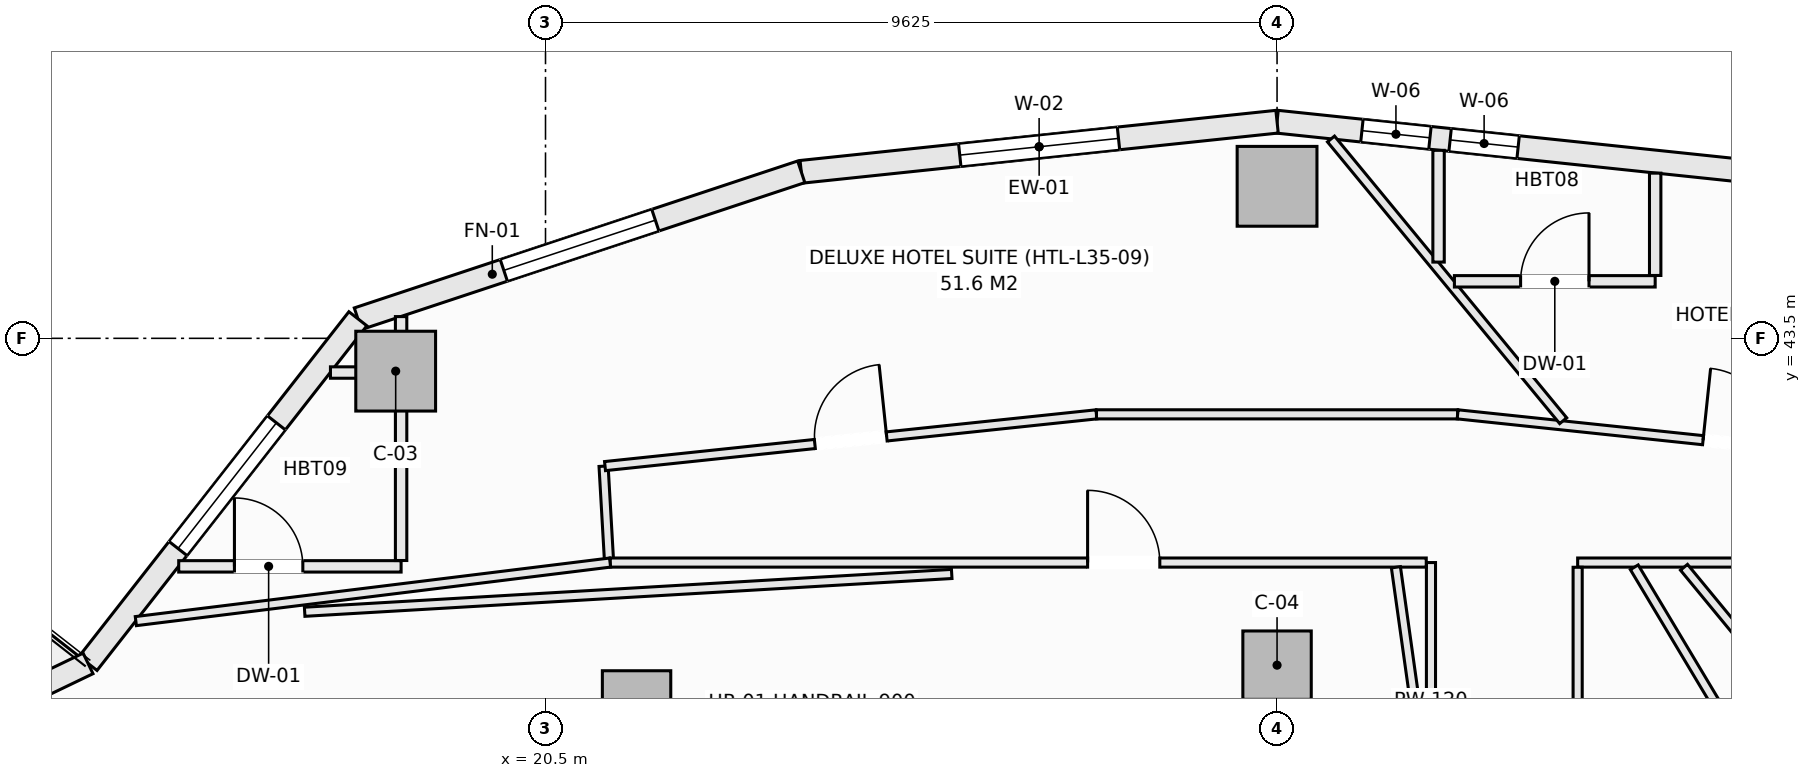
"""IFC4 building model, lengths in metres.
Left out: names, types, materials, properties, quantities, classifications, styles, units other than length and angle.
Written with IfcOpenShell. Run it as: python <this file> out.ifc"""

import sys

from ifc_helpers import new_model, si_unit, direction, frame, frame_2d, origin, origin_2d, place, context, subcontext, project, spatial, rectangle, extrude, element, fill, save


model = new_model("IFC4")
c1 = context("Model", 3, precision=1e-05, world=origin(), true_north=direction((0.0, 1.0)))
c2 = subcontext(c1, "Body", "Model", "MODEL_VIEW")
j1 = project(units=[si_unit("LENGTHUNIT", "METRE"), si_unit("PLANEANGLEUNIT", "RADIAN")], contexts=[c1])
p1 = place(None, origin())
s1 = spatial("IfcSite", under=j1, at=p1, CompositionType="ELEMENT")
p2 = place(p1, origin())
s2 = spatial("IfcBuilding", under=s1, at=p2, CompositionType="ELEMENT")
p3 = place(p2, frame((0.0, 0.0, 139.3)))
s3 = spatial("IfcBuildingStorey", under=s2, at=p3, CompositionType="ELEMENT", Elevation=139.3)
for number, where, z_axis, x_axis in (
    (1, (30.125, 45.5, -0.27), (0.0, 0.0, 1.0), (1.0, 0.0, 0.0)),
    (2, (18.529, 43.068, -0.27), (0.0, 0.0, 1.0), (1.0, 0.0, 0.0)),
):
    element("IfcColumn", number, at=place(p3, frame(where, z_axis=z_axis, x_axis=x_axis)), inside=s3, PredefinedType="COLUMN", context=c2, shape_type="SweptSolid", body=[
        extrude(rectangle(XDim=1.05, YDim=1.05, at=origin_2d()), origin(), (0.0, 0.0, 1.0), 3.4),
    ])
for number, where, z_axis, x_axis in (
    (3, (30.125, 39.2, -0.27), (0.0, 0.0, 1.0), (1.0, 0.0, 0.0)),
    (4, (21.698, 38.677, -0.27), (0.0, 0.0, 1.0), (1.0, 0.0, 0.0)),
):
    element("IfcColumn", number, at=place(p3, frame(where, z_axis=z_axis, x_axis=x_axis)), inside=s3, PredefinedType="COLUMN", context=c2, shape_type="SweptSolid", body=[
        extrude(rectangle(XDim=0.9, YDim=0.9, at=origin_2d()), origin(), (0.0, 0.0, 1.0), 3.4),
    ])
p4 = place(p3, frame((30.125, 46.35, 0.0), z_axis=(0.0, 0.0, 1.0), x_axis=(0.994498012394, -0.104755445421, 0.0)))
e5 = element("IfcWall", 5, at=p4, inside=s3, PredefinedType="SOLIDWALL", context=c2, shape_type="SweptSolid", body=[
    extrude(rectangle(XDim=6.295, YDim=0.3, at=frame_2d((3.147, 0.0))), origin(), (0.0, 0.0, 1.0), 2.653),
])
p5 = place(p4, frame((1.123, 0.0, 0.74)))
e6 = element("IfcOpeningElement", 6, at=p5, cuts=e5, PredefinedType="OPENING", context=c2, shape_type="SweptSolid", body=[
    extrude(rectangle(XDim=0.9, YDim=1.7, at=frame_2d((0.45, 0.85))), frame((0.0, 0.16, 0.0), z_axis=(0.0, -1.0, 0.0), x_axis=(1.0, 0.0, 0.0)), (0.0, 0.0, 1.0), 0.32),
])
p6 = place(p4, frame((2.289, 0.0, 0.74)))
e7 = element("IfcOpeningElement", 7, at=p6, cuts=e5, PredefinedType="OPENING", context=c2, shape_type="SweptSolid", body=[
    extrude(rectangle(XDim=0.9, YDim=1.7, at=frame_2d((0.45, 0.85))), frame((0.0, 0.16, 0.0), z_axis=(0.0, -1.0, 0.0), x_axis=(1.0, 0.0, 0.0)), (0.0, 0.0, 1.0), 0.32),
])
p7 = place(p3, frame((23.865, 45.691, 0.0), z_axis=(0.0, 0.0, 1.0), x_axis=(0.994498012394, 0.104755445421, 0.0)))
e8 = element("IfcWall", 8, at=p7, inside=s3, PredefinedType="SOLIDWALL", context=c2, shape_type="SweptSolid", body=[
    extrude(rectangle(XDim=6.295, YDim=0.3, at=frame_2d((3.147, 0.0))), origin(), (0.0, 0.0, 1.0), 2.653),
])
p8 = place(p7, frame((2.097, 0.0, 0.74)))
e9 = element("IfcOpeningElement", 9, at=p8, cuts=e8, PredefinedType="OPENING", context=c2, shape_type="SweptSolid", body=[
    extrude(rectangle(XDim=2.1, YDim=1.7, at=frame_2d((1.05, 0.85))), frame((0.0, 0.16, 0.0), z_axis=(0.0, -1.0, 0.0), x_axis=(1.0, 0.0, 0.0)), (0.0, 0.0, 1.0), 0.32),
])
p9 = place(p3, frame((18.031, 43.758, 0.0), z_axis=(0.0, 0.0, 1.0), x_axis=(0.949238009374, 0.314558741032, 0.0)))
e10 = element("IfcWall", 10, at=p9, inside=s3, PredefinedType="SOLIDWALL", context=c2, shape_type="SweptSolid", body=[
    extrude(rectangle(XDim=6.146, YDim=0.3, at=frame_2d((3.073, 0.0))), origin(), (0.0, 0.0, 1.0), 2.653),
])
p10 = place(p9, frame((2.023, 0.0, 0.74)))
e11 = element("IfcOpeningElement", 11, at=p10, cuts=e10, PredefinedType="OPENING", context=c2, shape_type="SweptSolid", body=[
    extrude(rectangle(XDim=2.1, YDim=1.7, at=frame_2d((1.05, 0.85))), frame((0.0, 0.16, 0.0), z_axis=(0.0, -1.0, 0.0), x_axis=(1.0, 0.0, 0.0)), (0.0, 0.0, 1.0), 0.32),
])
p11 = place(p3, frame((14.481, 39.223, 0.0), z_axis=(0.0, 0.0, 1.0), x_axis=(0.616435134162, 0.787405693001, 0.0)))
e12 = element("IfcWall", 12, at=p11, inside=s3, PredefinedType="SOLIDWALL", context=c2, shape_type="SweptSolid", body=[
    extrude(rectangle(XDim=5.759, YDim=0.3, at=frame_2d((2.879, 0.0))), origin(), (0.0, 0.0, 1.0), 2.653),
])
p12 = place(p11, frame((1.92, 0.0, 0.74)))
e13 = element("IfcOpeningElement", 13, at=p12, cuts=e12, PredefinedType="OPENING", context=c2, shape_type="SweptSolid", body=[
    extrude(rectangle(XDim=2.1, YDim=1.7, at=frame_2d((1.05, 0.85))), frame((0.0, 0.16, 0.0), z_axis=(0.0, -1.0, 0.0), x_axis=(1.0, 0.0, 0.0)), (0.0, 0.0, 1.0), 0.32),
])
p13 = place(p3, frame((9.178, 36.675, 0.0), z_axis=(0.0, 0.0, 1.0), x_axis=(0.901370184739, 0.433049408339, 0.0)))
e14 = element("IfcWall", 14, at=p13, inside=s3, PredefinedType="SOLIDWALL", context=c2, shape_type="SweptSolid", body=[
    extrude(rectangle(XDim=5.884, YDim=0.3, at=frame_2d((2.942, 0.0))), origin(), (0.0, 0.0, 1.0), 2.653),
])
p14 = place(p13, frame((1.892, 0.0, 0.74)))
e15 = element("IfcOpeningElement", 15, at=p14, cuts=e14, PredefinedType="OPENING", context=c2, shape_type="SweptSolid", body=[
    extrude(rectangle(XDim=2.1, YDim=1.7, at=frame_2d((1.05, 0.85))), frame((0.0, 0.16, 0.0), z_axis=(0.0, -1.0, 0.0), x_axis=(1.0, 0.0, 0.0)), (0.0, 0.0, 1.0), 0.32),
])
p15 = place(p3, frame((21.264, 41.818, 0.0), z_axis=(0.0, 0.0, 1.0), x_axis=(0.0574492264, -0.99834842935, 0.0)))
e16 = element("IfcWall", 16, at=p15, inside=s3, PredefinedType="PARTITIONING", context=c2, shape_type="SweptSolid", body=[
    extrude(rectangle(XDim=1.271, YDim=0.12, at=frame_2d((0.635, 0.0))), origin(), (0.0, 0.0, 1.0), 3.13),
])
p16 = place(p3, frame((32.15, 35.812, 0.0), z_axis=(0.0, 0.0, 1.0), x_axis=(0.0, 1.0, 0.0)))
e17 = element("IfcWall", 17, at=p16, inside=s3, PredefinedType="PARTITIONING", context=c2, shape_type="SweptSolid", body=[
    extrude(rectangle(XDim=4.738, YDim=0.12, at=frame_2d((2.369, 0.0))), origin(), (0.0, 0.0, 1.0), 3.13),
])
p17 = place(p3, frame((21.351, 40.55, 0.0), z_axis=(0.0, 0.0, 1.0), x_axis=(1.0, 0.0, 0.0)))
e18 = element("IfcWall", 18, at=p17, inside=s3, PredefinedType="PARTITIONING", context=c2, shape_type="SweptSolid", body=[
    extrude(rectangle(XDim=10.737, YDim=0.12, at=frame_2d((5.369, 0.0))), origin(), (0.0, 0.0, 1.0), 3.13),
])
p18 = place(p17, frame((6.282, 0.0, 0.0)))
e19 = element("IfcOpeningElement", 19, at=p18, cuts=e18, PredefinedType="OPENING", context=c2, shape_type="SweptSolid", body=[
    extrude(rectangle(XDim=0.95, YDim=2.1, at=frame_2d((0.475, 1.05))), frame((0.0, 0.07, 0.0), z_axis=(0.0, -1.0, 0.0), x_axis=(1.0, 0.0, 0.0)), (0.0, 0.0, 1.0), 0.14),
])
p19 = place(p3, frame((34.08, 40.55, 0.0), z_axis=(0.0, 0.0, 1.0), x_axis=(1.0, 0.0, 0.0)))
e20 = element("IfcWall", 20, at=p19, inside=s3, PredefinedType="PARTITIONING", context=c2, shape_type="SweptSolid", body=[
    extrude(rectangle(XDim=4.82, YDim=0.12, at=frame_2d((2.41, 0.0))), origin(), (0.0, 0.0, 1.0), 3.13),
])
p20 = place(p19, frame((2.368, 0.0, 0.0)))
e21 = element("IfcOpeningElement", 21, at=p20, cuts=e20, PredefinedType="OPENING", context=c2, shape_type="SweptSolid", body=[
    extrude(rectangle(XDim=0.95, YDim=2.1, at=frame_2d((0.475, 1.05))), frame((0.0, 0.07, 0.0), z_axis=(0.0, -1.0, 0.0), x_axis=(1.0, 0.0, 0.0)), (0.0, 0.0, 1.0), 0.14),
])
p21 = place(p3, frame((21.283, 41.819, 0.0), z_axis=(0.0, 0.0, 1.0), x_axis=(0.994501131299, 0.104725831799, 0.0)))
e22 = element("IfcWall", 22, at=p21, inside=s3, PredefinedType="PARTITIONING", context=c2, shape_type="SweptSolid", body=[
    extrude(rectangle(XDim=6.502, YDim=0.12, at=frame_2d((3.251, 0.0))), origin(), (0.0, 0.0, 1.0), 3.13),
])
p22 = place(p21, frame((2.776, 0.0, 0.0)))
e23 = element("IfcOpeningElement", 23, at=p22, cuts=e22, PredefinedType="OPENING", context=c2, shape_type="SweptSolid", body=[
    extrude(rectangle(XDim=0.95, YDim=2.1, at=frame_2d((0.475, 1.05))), frame((0.0, 0.07, 0.0), z_axis=(0.0, -1.0, 0.0), x_axis=(1.0, 0.0, 0.0)), (0.0, 0.0, 1.0), 0.14),
])
p23 = place(p3, frame((27.749, 42.5, 0.0), z_axis=(0.0, 0.0, 1.0), x_axis=(1.0, 0.0, 0.0)))
e24 = element("IfcWall", 24, at=p23, inside=s3, PredefinedType="PARTITIONING", context=c2, shape_type="SweptSolid", body=[
    extrude(rectangle(XDim=4.752, YDim=0.12, at=frame_2d((2.376, 0.0))), origin(), (0.0, 0.0, 1.0), 3.13),
])
p24 = place(p3, frame((32.501, 42.5, 0.0), z_axis=(0.0, 0.0, 1.0), x_axis=(0.994501131299, -0.104725831799, 0.0)))
e25 = element("IfcWall", 25, at=p24, inside=s3, PredefinedType="PARTITIONING", context=c2, shape_type="SweptSolid", body=[
    extrude(rectangle(XDim=6.502, YDim=0.12, at=frame_2d((3.251, 0.0))), origin(), (0.0, 0.0, 1.0), 3.13),
])
p25 = place(p24, frame((3.247, 0.0, 0.0)))
e26 = element("IfcOpeningElement", 26, at=p25, cuts=e25, PredefinedType="OPENING", context=c2, shape_type="SweptSolid", body=[
    extrude(rectangle(XDim=0.95, YDim=2.1, at=frame_2d((0.475, 1.05))), frame((0.0, 0.07, 0.0), z_axis=(0.0, -1.0, 0.0), x_axis=(1.0, 0.0, 0.0)), (0.0, 0.0, 1.0), 0.14),
])
p26 = place(p3, frame((34.08, 35.812, 0.0), z_axis=(0.0, 0.0, 1.0), x_axis=(0.0, 1.0, 0.0)))
e27 = element("IfcWall", 27, at=p26, inside=s3, PredefinedType="PARTITIONING", context=c2, shape_type="SweptSolid", body=[
    extrude(rectangle(XDim=4.676, YDim=0.12, at=frame_2d((2.338, 0.0))), origin(), (0.0, 0.0, 1.0), 2.812),
])
p27 = place(p3, frame((34.825, 40.488, 0.0), z_axis=(0.0, 0.0, 1.0), x_axis=(0.513579710685, -0.85804188754, 0.0)))
e28 = element("IfcWall", 28, at=p27, inside=s3, PredefinedType="PARTITIONING", context=c2, shape_type="SweptSolid", body=[
    extrude(rectangle(XDim=5.45, YDim=0.12, at=frame_2d((2.725, 0.0))), origin(), (0.0, 0.0, 1.0), 3.13),
])
p28 = place(p3, frame((30.835, 46.122, 0.0), z_axis=(0.0, 0.0, 1.0), x_axis=(0.636070633964, -0.771630836999, 0.0)))
e29 = element("IfcWall", 29, at=p28, inside=s3, PredefinedType="PARTITIONING", context=c2, shape_type="SweptSolid", body=[
    extrude(rectangle(XDim=4.803, YDim=0.12, at=frame_2d((2.402, 0.0))), origin(), (0.0, 0.0, 1.0), 2.653),
])
p29 = place(p3, frame((35.479, 40.488, 0.0), z_axis=(0.0, 0.0, 1.0), x_axis=(0.636055982797, -0.771642914014, 0.0)))
e30 = element("IfcWall", 30, at=p29, inside=s3, PredefinedType="PARTITIONING", context=c2, shape_type="SweptSolid", body=[
    extrude(rectangle(XDim=26.473, YDim=0.12, at=frame_2d((13.236, 0.0))), origin(), (0.0, 0.0, 1.0), 2.812),
])
p30 = place(p3, frame((32.458, 44.25, 0.0), z_axis=(0.0, 0.0, 1.0), x_axis=(1.0, 0.0, 0.0)))
e31 = element("IfcWall", 31, at=p30, inside=s3, PredefinedType="PARTITIONING", context=c2, shape_type="SweptSolid", body=[
    extrude(rectangle(XDim=2.642, YDim=0.15, at=frame_2d((1.321, 0.0))), origin(), (0.0, 0.0, 1.0), 3.13),
])
p31 = place(p30, frame((0.871, 0.0, 0.0)))
e32 = element("IfcOpeningElement", 32, at=p31, cuts=e31, PredefinedType="OPENING", context=c2, shape_type="SweptSolid", body=[
    extrude(rectangle(XDim=0.9, YDim=2.1, at=frame_2d((0.45, 1.05))), frame((0.0, 0.085, 0.0), z_axis=(0.0, -1.0, 0.0), x_axis=(1.0, 0.0, 0.0)), (0.0, 0.0, 1.0), 0.17),
])
p32 = place(p3, frame((35.1, 44.327, 0.0), z_axis=(0.0, 0.0, 1.0), x_axis=(0.0, 1.0, 0.0)))
e33 = element("IfcWall", 33, at=p32, inside=s3, PredefinedType="PARTITIONING", context=c2, shape_type="SweptSolid", body=[
    extrude(rectangle(XDim=1.346, YDim=0.15, at=frame_2d((0.673, 0.0))), origin(), (0.0, 0.0, 1.0), 3.13),
])
p33 = place(p3, frame((32.25, 44.503, 0.0), z_axis=(0.0, 0.0, 1.0), x_axis=(0.0, 1.0, 0.0)))
e34 = element("IfcWall", 34, at=p33, inside=s3, PredefinedType="PARTITIONING", context=c2, shape_type="SweptSolid", body=[
    extrude(rectangle(XDim=1.47, YDim=0.15, at=frame_2d((0.735, 0.0))), origin(), (0.0, 0.0, 1.0), 3.13),
])
p34 = place(p3, frame((15.674, 40.5, 0.0), z_axis=(0.0, 0.0, 1.0), x_axis=(1.0, 0.0, 0.0)))
e35 = element("IfcWall", 35, at=p34, inside=s3, PredefinedType="PARTITIONING", context=c2, shape_type="SweptSolid", body=[
    extrude(rectangle(XDim=2.926, YDim=0.15, at=frame_2d((1.463, 0.0))), origin(), (0.0, 0.0, 1.0), 3.13),
])
p35 = place(p34, frame((0.733, 0.0, 0.0)))
e36 = element("IfcOpeningElement", 36, at=p35, cuts=e35, PredefinedType="OPENING", context=c2, shape_type="SweptSolid", body=[
    extrude(rectangle(XDim=0.9, YDim=2.1, at=frame_2d((0.45, 1.05))), frame((0.0, 0.085, 0.0), z_axis=(0.0, -1.0, 0.0), x_axis=(1.0, 0.0, 0.0)), (0.0, 0.0, 1.0), 0.17),
])
p36 = place(p3, frame((18.6, 40.577, 0.0), z_axis=(0.0, 0.0, 1.0), x_axis=(0.0, 1.0, 0.0)))
e37 = element("IfcWall", 37, at=p36, inside=s3, PredefinedType="PARTITIONING", context=c2, shape_type="SweptSolid", body=[
    extrude(rectangle(XDim=3.209, YDim=0.15, at=frame_2d((1.604, 0.0))), origin(), (0.0, 0.0, 1.0), 1.922),
])
p37 = place(p3, frame((17.67, 43.05, 0.0), z_axis=(0.0, 0.0, 1.0), x_axis=(1.0, 0.0, 0.0)))
e38 = element("IfcWall", 38, at=p37, inside=s3, PredefinedType="PARTITIONING", context=c2, shape_type="SweptSolid", body=[
    extrude(rectangle(XDim=0.853, YDim=0.15, at=frame_2d((0.426, 0.0))), origin(), (0.0, 0.0, 1.0), 2.653),
])
p38 = place(p3, frame((15.11, 39.78, 0.0), z_axis=(0.0, 0.0, 1.0), x_axis=(0.992465524728, 0.122524210773, 0.0)))
e39 = element("IfcWall", 39, at=p38, inside=s3, PredefinedType="PARTITIONING", context=c2, shape_type="SweptSolid", body=[
    extrude(rectangle(XDim=6.287, YDim=0.12, at=frame_2d((3.143, 0.0))), origin(), (0.0, 0.0, 1.0), 3.13),
])
p39 = place(p3, frame((17.331, 39.903, 0.0), z_axis=(0.0, 0.0, 1.0), x_axis=(0.998298083041, 0.0583175565, 0.0)))
e40 = element("IfcWall", 40, at=p39, inside=s3, PredefinedType="PARTITIONING", context=c2, shape_type="SweptSolid", body=[
    extrude(rectangle(XDim=8.528, YDim=0.12, at=frame_2d((4.264, 0.0))), origin(), (0.0, 0.0, 1.0), 3.13),
])
p40 = place(p3, frame((31.689, 40.488, 0.0), z_axis=(0.0, 0.0, 1.0), x_axis=(0.139205728255, -0.990263482726, 0.0)))
e41 = element("IfcWall", 41, at=p40, inside=s3, PredefinedType="PARTITIONING", context=c2, shape_type="SweptSolid", body=[
    extrude(rectangle(XDim=2.438, YDim=0.12, at=frame_2d((1.219, 0.0))), origin(), (0.0, 0.0, 1.0), 3.13),
])
p41 = place(p5, origin())
e42 = element("IfcWindow", 42, at=p41, inside=s3, PartitioningType="SINGLE_PANEL", PredefinedType="WINDOW", context=c2, shape_type="SweptSolid", body=[
    extrude(rectangle(XDim=0.9, YDim=1.7, at=frame_2d((0.45, 0.85))), frame((0.0, 0.03, 0.0), z_axis=(0.0, -1.0, 0.0), x_axis=(1.0, 0.0, 0.0)), (0.0, 0.0, 1.0), 0.06),
])
fill(e6, e42)
p42 = place(p8, origin())
e43 = element("IfcWindow", 43, at=p42, inside=s3, PartitioningType="SINGLE_PANEL", PredefinedType="WINDOW", context=c2, shape_type="SweptSolid", body=[
    extrude(rectangle(XDim=2.1, YDim=1.7, at=frame_2d((1.05, 0.85))), frame((0.0, 0.03, 0.0), z_axis=(0.0, -1.0, 0.0), x_axis=(1.0, 0.0, 0.0)), (0.0, 0.0, 1.0), 0.06),
])
fill(e9, e43)
p43 = place(p10, origin())
e44 = element("IfcWindow", 44, at=p43, inside=s3, PartitioningType="SINGLE_PANEL", PredefinedType="WINDOW", context=c2, shape_type="SweptSolid", body=[
    extrude(rectangle(XDim=2.1, YDim=1.7, at=frame_2d((1.05, 0.85))), frame((0.0, 0.03, 0.0), z_axis=(0.0, -1.0, 0.0), x_axis=(1.0, 0.0, 0.0)), (0.0, 0.0, 1.0), 0.06),
])
fill(e11, e44)
p44 = place(p12, origin())
e45 = element("IfcWindow", 45, at=p44, inside=s3, PartitioningType="SINGLE_PANEL", PredefinedType="WINDOW", context=c2, shape_type="SweptSolid", body=[
    extrude(rectangle(XDim=2.1, YDim=1.7, at=frame_2d((1.05, 0.85))), frame((0.0, 0.03, 0.0), z_axis=(0.0, -1.0, 0.0), x_axis=(1.0, 0.0, 0.0)), (0.0, 0.0, 1.0), 0.06),
])
fill(e13, e45)
p45 = place(p25, origin())
e46 = element("IfcDoor", 46, at=p45, inside=s3, OperationType="SINGLE_SWING_LEFT", PredefinedType="DOOR", context=c2, shape_type="SweptSolid", body=[
    extrude(rectangle(XDim=0.95, YDim=2.1, at=frame_2d((0.475, 1.05))), frame((0.0, 0.025, 0.0), z_axis=(0.0, -1.0, 0.0), x_axis=(1.0, 0.0, 0.0)), (0.0, 0.0, 1.0), 0.05),
])
fill(e26, e46)
p46 = place(p22, origin())
e47 = element("IfcDoor", 47, at=p46, inside=s3, OperationType="SINGLE_SWING_RIGHT", PredefinedType="DOOR", context=c2, shape_type="SweptSolid", body=[
    extrude(rectangle(XDim=0.95, YDim=2.1, at=frame_2d((0.475, 1.05))), frame((0.0, 0.025, 0.0), z_axis=(0.0, -1.0, 0.0), x_axis=(1.0, 0.0, 0.0)), (0.0, 0.0, 1.0), 0.05),
])
fill(e23, e47)
p47 = place(p18, origin())
e48 = element("IfcDoor", 48, at=p47, inside=s3, OperationType="SINGLE_SWING_LEFT", PredefinedType="DOOR", context=c2, shape_type="SweptSolid", body=[
    extrude(rectangle(XDim=0.95, YDim=2.1, at=frame_2d((0.475, 1.05))), frame((0.0, 0.025, 0.0), z_axis=(0.0, -1.0, 0.0), x_axis=(1.0, 0.0, 0.0)), (0.0, 0.0, 1.0), 0.05),
])
fill(e19, e48)
p48 = place(p31, origin())
e49 = element("IfcDoor", 49, at=p48, inside=s3, OperationType="SINGLE_SWING_RIGHT", PredefinedType="DOOR", context=c2, shape_type="SweptSolid", body=[
    extrude(rectangle(XDim=0.9, YDim=2.1, at=frame_2d((0.45, 1.05))), frame((0.0, 0.025, 0.0), z_axis=(0.0, -1.0, 0.0), x_axis=(1.0, 0.0, 0.0)), (0.0, 0.0, 1.0), 0.05),
])
fill(e32, e49)
p49 = place(p35, origin())
e50 = element("IfcDoor", 50, at=p49, inside=s3, OperationType="SINGLE_SWING_LEFT", PredefinedType="DOOR", context=c2, shape_type="SweptSolid", body=[
    extrude(rectangle(XDim=0.9, YDim=2.1, at=frame_2d((0.45, 1.05))), frame((0.0, 0.025, 0.0), z_axis=(0.0, -1.0, 0.0), x_axis=(1.0, 0.0, 0.0)), (0.0, 0.0, 1.0), 0.05),
])
fill(e36, e50)
p50 = place(p6, origin())
e51 = element("IfcWindow", 51, at=p50, inside=s3, PartitioningType="SINGLE_PANEL", PredefinedType="WINDOW", context=c2, shape_type="SweptSolid", body=[
    extrude(rectangle(XDim=0.9, YDim=1.7, at=frame_2d((0.45, 0.85))), frame((0.0, 0.03, 0.0), z_axis=(0.0, -1.0, 0.0), x_axis=(1.0, 0.0, 0.0)), (0.0, 0.0, 1.0), 0.06),
])
fill(e7, e51)
save(model, sys.argv[1])
